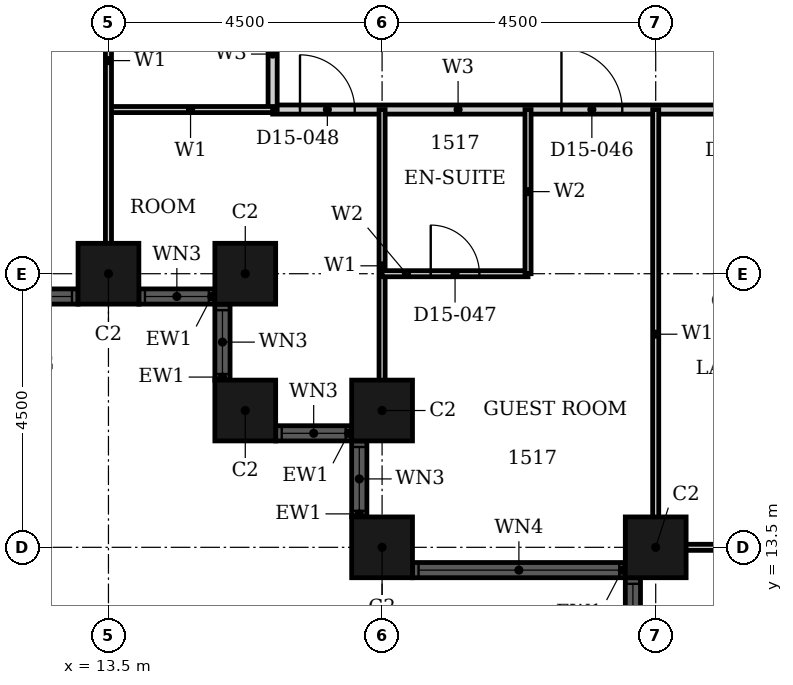
"""IFC4 building model, lengths in metres.
Left out: names, types, materials, properties, quantities, classifications, styles, units other than length and angle.
Written with IfcOpenShell. Run it as: python <this file> out.ifc"""

import sys

from ifc_helpers import new_model, si_unit, direction, frame, frame_2d, origin, origin_2d, place, context, subcontext, project, spatial, rectangle, hollow_rectangle, extrude, element, fill, save


model = new_model("IFC4")
c1 = context("Model", 3, precision=1e-05, world=origin(), true_north=direction((0.0, 1.0)))
c2 = subcontext(c1, "Body", "Model", "MODEL_VIEW")
j1 = project(units=[si_unit("LENGTHUNIT", "METRE"), si_unit("PLANEANGLEUNIT", "RADIAN")], contexts=[c1])
p1 = place(None, origin())
s1 = spatial("IfcSite", under=j1, at=p1, CompositionType="ELEMENT")
p2 = place(p1, origin())
s2 = spatial("IfcBuilding", under=s1, at=p2, CompositionType="ELEMENT")
p3 = place(p2, frame((0.0, 0.0, 67.2)))
s3 = spatial("IfcBuildingStorey", under=s2, at=p3, CompositionType="ELEMENT", Elevation=67.2)
for number, where, z_axis, x_axis in (
    (1, (13.5, 18.0, 0.0), (0.0, 0.0, 1.0), (1.0, 0.0, 0.0)),
    (2, (15.75, 18.0, 0.0), (0.0, 0.0, 1.0), (1.0, 0.0, 0.0)),
    (3, (15.75, 15.75, 0.0), (0.0, 0.0, 1.0), (1.0, 0.0, 0.0)),
    (4, (18.0, 15.75, 0.0), (0.0, 0.0, 1.0), (1.0, 0.0, 0.0)),
    (5, (18.0, 13.5, 0.0), (0.0, 0.0, 1.0), (1.0, 0.0, 0.0)),
    (6, (22.5, 13.5, 0.0), (0.0, 0.0, 1.0), (1.0, 0.0, 0.0)),
):
    element("IfcColumn", number, at=place(p3, frame(where, z_axis=z_axis, x_axis=x_axis)), inside=s3, PredefinedType="COLUMN", context=c2, shape_type="SweptSolid", body=[
        extrude(hollow_rectangle(XDim=1.0, YDim=1.0, WallThickness=0.032, at=origin_2d()), origin(), (0.0, 0.0, 1.0), 3.6),
    ])
p4 = place(p3, frame((5.0, 17.625, 0.0), z_axis=(0.0, 0.0, 1.0), x_axis=(1.0, 0.0, 0.0)))
e7 = element("IfcWall", 7, at=p4, inside=s3, PredefinedType="SOLIDWALL", context=c2, shape_type="SweptSolid", body=[
    extrude(rectangle(XDim=8.0, YDim=0.25, at=frame_2d((4.0, 0.0))), origin(), (0.0, 0.0, 1.0), 3.6),
])
p5 = place(p4, frame((0.1, 0.0, 0.9)))
e8 = element("IfcOpeningElement", 8, at=p5, cuts=e7, PredefinedType="OPENING", context=c2, shape_type="SweptSolid", body=[
    extrude(rectangle(XDim=3.3, YDim=2.08, at=frame_2d((1.65, 1.04))), frame((0.0, 0.135, 0.0), z_axis=(0.0, -1.0, 0.0), x_axis=(1.0, 0.0, 0.0)), (0.0, 0.0, 1.0), 0.27),
])
p6 = place(p4, frame((4.6, 0.0, 0.9)))
e9 = element("IfcOpeningElement", 9, at=p6, cuts=e7, PredefinedType="OPENING", context=c2, shape_type="SweptSolid", body=[
    extrude(rectangle(XDim=3.3, YDim=2.08, at=frame_2d((1.65, 1.04))), frame((0.0, 0.135, 0.0), z_axis=(0.0, -1.0, 0.0), x_axis=(1.0, 0.0, 0.0)), (0.0, 0.0, 1.0), 0.27),
])
p7 = place(p3, frame((14.0, 17.625, 0.0), z_axis=(0.0, 0.0, 1.0), x_axis=(1.0, 0.0, 0.0)))
e10 = element("IfcWall", 10, at=p7, inside=s3, PredefinedType="SOLIDWALL", context=c2, shape_type="SweptSolid", body=[
    extrude(rectangle(XDim=1.25, YDim=0.25, at=frame_2d((0.625, 0.0))), origin(), (0.0, 0.0, 1.0), 3.6),
])
p8 = place(p7, frame((0.1, 0.0, 0.9)))
e11 = element("IfcOpeningElement", 11, at=p8, cuts=e10, PredefinedType="OPENING", context=c2, shape_type="SweptSolid", body=[
    extrude(rectangle(XDim=1.05, YDim=2.08, at=frame_2d((0.525, 1.04))), frame((0.0, 0.135, 0.0), z_axis=(0.0, -1.0, 0.0), x_axis=(1.0, 0.0, 0.0)), (0.0, 0.0, 1.0), 0.27),
])
p9 = place(p3, frame((15.375, 17.5, 0.0), z_axis=(0.0, 0.0, 1.0), x_axis=(0.0, -1.0, 0.0)))
e12 = element("IfcWall", 12, at=p9, inside=s3, PredefinedType="SOLIDWALL", context=c2, shape_type="SweptSolid", body=[
    extrude(rectangle(XDim=1.25, YDim=0.25, at=frame_2d((0.625, 0.0))), origin(), (0.0, 0.0, 1.0), 3.6),
])
p10 = place(p9, frame((0.1, 0.0, 0.9)))
e13 = element("IfcOpeningElement", 13, at=p10, cuts=e12, PredefinedType="OPENING", context=c2, shape_type="SweptSolid", body=[
    extrude(rectangle(XDim=1.05, YDim=2.08, at=frame_2d((0.525, 1.04))), frame((0.0, 0.135, 0.0), z_axis=(0.0, -1.0, 0.0), x_axis=(1.0, 0.0, 0.0)), (0.0, 0.0, 1.0), 0.27),
])
p11 = place(p3, frame((16.25, 15.375, 0.0), z_axis=(0.0, 0.0, 1.0), x_axis=(1.0, 0.0, 0.0)))
e14 = element("IfcWall", 14, at=p11, inside=s3, PredefinedType="SOLIDWALL", context=c2, shape_type="SweptSolid", body=[
    extrude(rectangle(XDim=1.25, YDim=0.25, at=frame_2d((0.625, 0.0))), origin(), (0.0, 0.0, 1.0), 3.6),
])
p12 = place(p11, frame((0.1, 0.0, 0.9)))
e15 = element("IfcOpeningElement", 15, at=p12, cuts=e14, PredefinedType="OPENING", context=c2, shape_type="SweptSolid", body=[
    extrude(rectangle(XDim=1.05, YDim=2.08, at=frame_2d((0.525, 1.04))), frame((0.0, 0.135, 0.0), z_axis=(0.0, -1.0, 0.0), x_axis=(1.0, 0.0, 0.0)), (0.0, 0.0, 1.0), 0.27),
])
p13 = place(p3, frame((17.625, 15.25, 0.0), z_axis=(0.0, 0.0, 1.0), x_axis=(0.0, -1.0, 0.0)))
e16 = element("IfcWall", 16, at=p13, inside=s3, PredefinedType="SOLIDWALL", context=c2, shape_type="SweptSolid", body=[
    extrude(rectangle(XDim=1.25, YDim=0.25, at=frame_2d((0.625, 0.0))), origin(), (0.0, 0.0, 1.0), 3.6),
])
p14 = place(p13, frame((0.1, 0.0, 0.9)))
e17 = element("IfcOpeningElement", 17, at=p14, cuts=e16, PredefinedType="OPENING", context=c2, shape_type="SweptSolid", body=[
    extrude(rectangle(XDim=1.05, YDim=2.08, at=frame_2d((0.525, 1.04))), frame((0.0, 0.135, 0.0), z_axis=(0.0, -1.0, 0.0), x_axis=(1.0, 0.0, 0.0)), (0.0, 0.0, 1.0), 0.27),
])
p15 = place(p3, frame((18.5, 13.125, 0.0), z_axis=(0.0, 0.0, 1.0), x_axis=(1.0, 0.0, 0.0)))
e18 = element("IfcWall", 18, at=p15, inside=s3, PredefinedType="SOLIDWALL", context=c2, shape_type="SweptSolid", body=[
    extrude(rectangle(XDim=3.5, YDim=0.25, at=frame_2d((1.75, 0.0))), origin(), (0.0, 0.0, 1.0), 3.6),
])
p16 = place(p15, frame((0.1, 0.0, 0.9)))
e19 = element("IfcOpeningElement", 19, at=p16, cuts=e18, PredefinedType="OPENING", context=c2, shape_type="SweptSolid", body=[
    extrude(rectangle(XDim=3.3, YDim=2.08, at=frame_2d((1.65, 1.04))), frame((0.0, 0.135, 0.0), z_axis=(0.0, -1.0, 0.0), x_axis=(1.0, 0.0, 0.0)), (0.0, 0.0, 1.0), 0.27),
])
p17 = place(p3, frame((22.125, 13.0, 0.0), z_axis=(0.0, 0.0, 1.0), x_axis=(0.0, -1.0, 0.0)))
e20 = element("IfcWall", 20, at=p17, inside=s3, PredefinedType="SOLIDWALL", context=c2, shape_type="SweptSolid", body=[
    extrude(rectangle(XDim=8.0, YDim=0.25, at=frame_2d((4.0, 0.0))), origin(), (0.0, 0.0, 1.0), 3.6),
])
p18 = place(p17, frame((0.1, 0.0, 0.9)))
e21 = element("IfcOpeningElement", 21, at=p18, cuts=e20, PredefinedType="OPENING", context=c2, shape_type="SweptSolid", body=[
    extrude(rectangle(XDim=3.3, YDim=2.08, at=frame_2d((1.65, 1.04))), frame((0.0, 0.135, 0.0), z_axis=(0.0, -1.0, 0.0), x_axis=(1.0, 0.0, 0.0)), (0.0, 0.0, 1.0), 0.27),
])
p19 = place(p17, frame((4.6, 0.0, 0.9)))
e22 = element("IfcOpeningElement", 22, at=p19, cuts=e20, PredefinedType="OPENING", context=c2, shape_type="SweptSolid", body=[
    extrude(rectangle(XDim=3.3, YDim=2.08, at=frame_2d((1.65, 1.04))), frame((0.0, 0.135, 0.0), z_axis=(0.0, -1.0, 0.0), x_axis=(1.0, 0.0, 0.0)), (0.0, 0.0, 1.0), 0.27),
])
p20 = place(p3, frame((16.2, 20.7, 0.0), z_axis=(0.0, 0.0, 1.0), x_axis=(1.0, 0.0, 0.0)))
e23 = element("IfcWall", 23, at=p20, inside=s3, PredefinedType="PARTITIONING", context=c2, shape_type="SweptSolid", body=[
    extrude(rectangle(XDim=13.5, YDim=0.15, at=frame_2d((6.75, 0.0))), origin(), (0.0, 0.0, 1.0), 3.3),
])
p21 = place(p20, frame((4.75, 0.0, 0.0)))
e24 = element("IfcOpeningElement", 24, at=p21, cuts=e23, PredefinedType="OPENING", context=c2, shape_type="SweptSolid", body=[
    extrude(rectangle(XDim=1.0, YDim=2.1, at=frame_2d((0.5, 1.05))), frame((0.0, 0.085, 0.0), z_axis=(0.0, -1.0, 0.0), x_axis=(1.0, 0.0, 0.0)), (0.0, 0.0, 1.0), 0.17),
])
p22 = place(p20, frame((0.45, 0.0, 0.0)))
e25 = element("IfcOpeningElement", 25, at=p22, cuts=e23, PredefinedType="OPENING", context=c2, shape_type="SweptSolid", body=[
    extrude(rectangle(XDim=0.9, YDim=2.1, at=frame_2d((0.45, 1.05))), frame((0.0, 0.085, 0.0), z_axis=(0.0, -1.0, 0.0), x_axis=(1.0, 0.0, 0.0)), (0.0, 0.0, 1.0), 0.17),
])
p23 = place(p20, frame((7.35, 0.0, 0.0)))
e26 = element("IfcOpeningElement", 26, at=p23, cuts=e23, PredefinedType="OPENING", context=c2, shape_type="SweptSolid", body=[
    extrude(rectangle(XDim=0.9, YDim=2.1, at=frame_2d((0.45, 1.05))), frame((0.0, 0.085, 0.0), z_axis=(0.0, -1.0, 0.0), x_axis=(1.0, 0.0, 0.0)), (0.0, 0.0, 1.0), 0.17),
])
p24 = place(p20, frame((10.95, 0.0, 0.0)))
e27 = element("IfcOpeningElement", 27, at=p24, cuts=e23, PredefinedType="OPENING", context=c2, shape_type="SweptSolid", body=[
    extrude(rectangle(XDim=0.9, YDim=2.1, at=frame_2d((0.45, 1.05))), frame((0.0, 0.085, 0.0), z_axis=(0.0, -1.0, 0.0), x_axis=(1.0, 0.0, 0.0)), (0.0, 0.0, 1.0), 0.17),
])
p25 = place(p3, frame((16.2, 20.7, 0.0), z_axis=(0.0, 0.0, 1.0), x_axis=(0.0, 1.0, 0.0)))
e28 = element("IfcWall", 28, at=p25, inside=s3, PredefinedType="PARTITIONING", context=c2, shape_type="SweptSolid", body=[
    extrude(rectangle(XDim=4.5, YDim=0.15, at=frame_2d((2.25, 0.0))), origin(), (0.0, 0.0, 1.0), 3.3),
])
p26 = place(p25, frame((1.825, 0.0, 0.0)))
e29 = element("IfcOpeningElement", 29, at=p26, cuts=e28, PredefinedType="OPENING", context=c2, shape_type="SweptSolid", body=[
    extrude(rectangle(XDim=0.95, YDim=2.1, at=frame_2d((0.475, 1.05))), frame((0.0, 0.085, 0.0), z_axis=(0.0, -1.0, 0.0), x_axis=(1.0, 0.0, 0.0)), (0.0, 0.0, 1.0), 0.17),
])
p27 = place(p3, frame((22.31, 13.5, 0.0), z_axis=(0.0, 0.0, 1.0), x_axis=(1.0, 0.0, 0.0)))
e30 = element("IfcWall", 30, at=p27, inside=s3, PredefinedType="PARTITIONING", context=c2, shape_type="SweptSolid", body=[
    extrude(rectangle(XDim=7.39, YDim=0.1, at=frame_2d((3.695, 0.0))), origin(), (0.0, 0.0, 1.0), 2.38),
])
p28 = place(p3, frame((13.5, 20.7, 0.0), z_axis=(0.0, 0.0, 1.0), x_axis=(1.0, 0.0, 0.0)))
e31 = element("IfcWall", 31, at=p28, inside=s3, PredefinedType="PARTITIONING", context=c2, shape_type="SweptSolid", body=[
    extrude(rectangle(XDim=2.7, YDim=0.1, at=frame_2d((1.35, 0.0))), origin(), (0.0, 0.0, 1.0), 3.3),
])
p29 = place(p3, frame((13.5, 17.81, 0.0), z_axis=(0.0, 0.0, 1.0), x_axis=(0.0, 1.0, 0.0)))
e32 = element("IfcWall", 32, at=p29, inside=s3, PredefinedType="PARTITIONING", context=c2, shape_type="SweptSolid", body=[
    extrude(rectangle(XDim=7.39, YDim=0.1, at=frame_2d((3.695, 0.0))), origin(), (0.0, 0.0, 1.0), 2.38),
])
p30 = place(p3, frame((18.0, 15.56, 0.0), z_axis=(0.0, 0.0, 1.0), x_axis=(0.0, 1.0, 0.0)))
e33 = element("IfcWall", 33, at=p30, inside=s3, PredefinedType="PARTITIONING", context=c2, shape_type="SweptSolid", body=[
    extrude(rectangle(XDim=5.14, YDim=0.1, at=frame_2d((2.57, 0.0))), origin(), (0.0, 0.0, 1.0), 3.3),
])
p31 = place(p3, frame((22.5, 13.31, 0.0), z_axis=(0.0, 0.0, 1.0), x_axis=(0.0, 1.0, 0.0)))
e34 = element("IfcWall", 34, at=p31, inside=s3, PredefinedType="PARTITIONING", context=c2, shape_type="SweptSolid", body=[
    extrude(rectangle(XDim=7.39, YDim=0.1, at=frame_2d((3.695, 0.0))), origin(), (0.0, 0.0, 1.0), 3.3),
])
p32 = place(p3, frame((18.0, 18.0, 0.0), z_axis=(0.0, 0.0, 1.0), x_axis=(1.0, 0.0, 0.0)))
e35 = element("IfcWall", 35, at=p32, inside=s3, PredefinedType="PARTITIONING", context=c2, shape_type="SweptSolid", body=[
    extrude(rectangle(XDim=2.4, YDim=0.1, at=frame_2d((1.2, 0.0))), origin(), (0.0, 0.0, 1.0), 3.3),
])
p33 = place(p32, frame((0.8, 0.0, 0.0)))
e36 = element("IfcOpeningElement", 36, at=p33, cuts=e35, PredefinedType="OPENING", context=c2, shape_type="SweptSolid", body=[
    extrude(rectangle(XDim=0.8, YDim=2.1, at=frame_2d((0.4, 1.05))), frame((0.0, 0.06, 0.0), z_axis=(0.0, -1.0, 0.0), x_axis=(1.0, 0.0, 0.0)), (0.0, 0.0, 1.0), 0.12),
])
p34 = place(p3, frame((20.4, 18.0, 0.0), z_axis=(0.0, 0.0, 1.0), x_axis=(0.0, 1.0, 0.0)))
e37 = element("IfcWall", 37, at=p34, inside=s3, PredefinedType="PARTITIONING", context=c2, shape_type="SweptSolid", body=[
    extrude(rectangle(XDim=2.7, YDim=0.1, at=frame_2d((1.35, 0.0))), origin(), (0.0, 0.0, 1.0), 3.3),
])
p35 = place(p6, origin())
e38 = element("IfcWindow", 38, at=p35, inside=s3, PartitioningType="SINGLE_PANEL", PredefinedType="WINDOW", context=c2, shape_type="SweptSolid", body=[
    extrude(rectangle(XDim=3.3, YDim=2.08, at=frame_2d((1.65, 1.04))), frame((0.0, 0.03, 0.0), z_axis=(0.0, -1.0, 0.0), x_axis=(1.0, 0.0, 0.0)), (0.0, 0.0, 1.0), 0.06),
])
fill(e9, e38)
p36 = place(p8, origin())
e39 = element("IfcWindow", 39, at=p36, inside=s3, PartitioningType="SINGLE_PANEL", PredefinedType="WINDOW", context=c2, shape_type="SweptSolid", body=[
    extrude(rectangle(XDim=1.05, YDim=2.08, at=frame_2d((0.525, 1.04))), frame((0.0, 0.03, 0.0), z_axis=(0.0, -1.0, 0.0), x_axis=(1.0, 0.0, 0.0)), (0.0, 0.0, 1.0), 0.06),
])
fill(e11, e39)
p37 = place(p10, origin())
e40 = element("IfcWindow", 40, at=p37, inside=s3, PartitioningType="SINGLE_PANEL", PredefinedType="WINDOW", context=c2, shape_type="SweptSolid", body=[
    extrude(rectangle(XDim=1.05, YDim=2.08, at=frame_2d((0.525, 1.04))), frame((0.0, 0.03, 0.0), z_axis=(0.0, -1.0, 0.0), x_axis=(1.0, 0.0, 0.0)), (0.0, 0.0, 1.0), 0.06),
])
fill(e13, e40)
p38 = place(p12, origin())
e41 = element("IfcWindow", 41, at=p38, inside=s3, PartitioningType="SINGLE_PANEL", PredefinedType="WINDOW", context=c2, shape_type="SweptSolid", body=[
    extrude(rectangle(XDim=1.05, YDim=2.08, at=frame_2d((0.525, 1.04))), frame((0.0, 0.03, 0.0), z_axis=(0.0, -1.0, 0.0), x_axis=(1.0, 0.0, 0.0)), (0.0, 0.0, 1.0), 0.06),
])
fill(e15, e41)
p39 = place(p14, origin())
e42 = element("IfcWindow", 42, at=p39, inside=s3, PartitioningType="SINGLE_PANEL", PredefinedType="WINDOW", context=c2, shape_type="SweptSolid", body=[
    extrude(rectangle(XDim=1.05, YDim=2.08, at=frame_2d((0.525, 1.04))), frame((0.0, 0.03, 0.0), z_axis=(0.0, -1.0, 0.0), x_axis=(1.0, 0.0, 0.0)), (0.0, 0.0, 1.0), 0.06),
])
fill(e17, e42)
p40 = place(p16, origin())
e43 = element("IfcWindow", 43, at=p40, inside=s3, PartitioningType="SINGLE_PANEL", PredefinedType="WINDOW", context=c2, shape_type="SweptSolid", body=[
    extrude(rectangle(XDim=3.3, YDim=2.08, at=frame_2d((1.65, 1.04))), frame((0.0, 0.03, 0.0), z_axis=(0.0, -1.0, 0.0), x_axis=(1.0, 0.0, 0.0)), (0.0, 0.0, 1.0), 0.06),
])
fill(e19, e43)
p41 = place(p18, origin())
e44 = element("IfcWindow", 44, at=p41, inside=s3, PartitioningType="SINGLE_PANEL", PredefinedType="WINDOW", context=c2, shape_type="SweptSolid", body=[
    extrude(rectangle(XDim=3.3, YDim=2.08, at=frame_2d((1.65, 1.04))), frame((0.0, 0.03, 0.0), z_axis=(0.0, -1.0, 0.0), x_axis=(1.0, 0.0, 0.0)), (0.0, 0.0, 1.0), 0.06),
])
fill(e21, e44)
p42 = place(p21, origin())
e45 = element("IfcDoor", 45, at=p42, inside=s3, OperationType="SINGLE_SWING_RIGHT", PredefinedType="DOOR", context=c2, shape_type="SweptSolid", body=[
    extrude(rectangle(XDim=1.0, YDim=2.1, at=frame_2d((0.5, 1.05))), frame((0.0, 0.025, 0.0), z_axis=(0.0, -1.0, 0.0), x_axis=(1.0, 0.0, 0.0)), (0.0, 0.0, 1.0), 0.05),
])
fill(e24, e45)
p43 = place(p33, origin())
e46 = element("IfcDoor", 46, at=p43, inside=s3, OperationType="SINGLE_SWING_LEFT", PredefinedType="DOOR", context=c2, shape_type="SweptSolid", body=[
    extrude(rectangle(XDim=0.8, YDim=2.1, at=frame_2d((0.4, 1.05))), frame((0.0, 0.025, 0.0), z_axis=(0.0, -1.0, 0.0), x_axis=(1.0, 0.0, 0.0)), (0.0, 0.0, 1.0), 0.05),
])
fill(e36, e46)
p44 = place(p22, origin())
e47 = element("IfcDoor", 47, at=p44, inside=s3, OperationType="SINGLE_SWING_LEFT", PredefinedType="DOOR", context=c2, shape_type="SweptSolid", body=[
    extrude(rectangle(XDim=0.9, YDim=2.1, at=frame_2d((0.45, 1.05))), frame((0.0, 0.025, 0.0), z_axis=(0.0, -1.0, 0.0), x_axis=(1.0, 0.0, 0.0)), (0.0, 0.0, 1.0), 0.05),
])
fill(e25, e47)
save(model, sys.argv[1])
